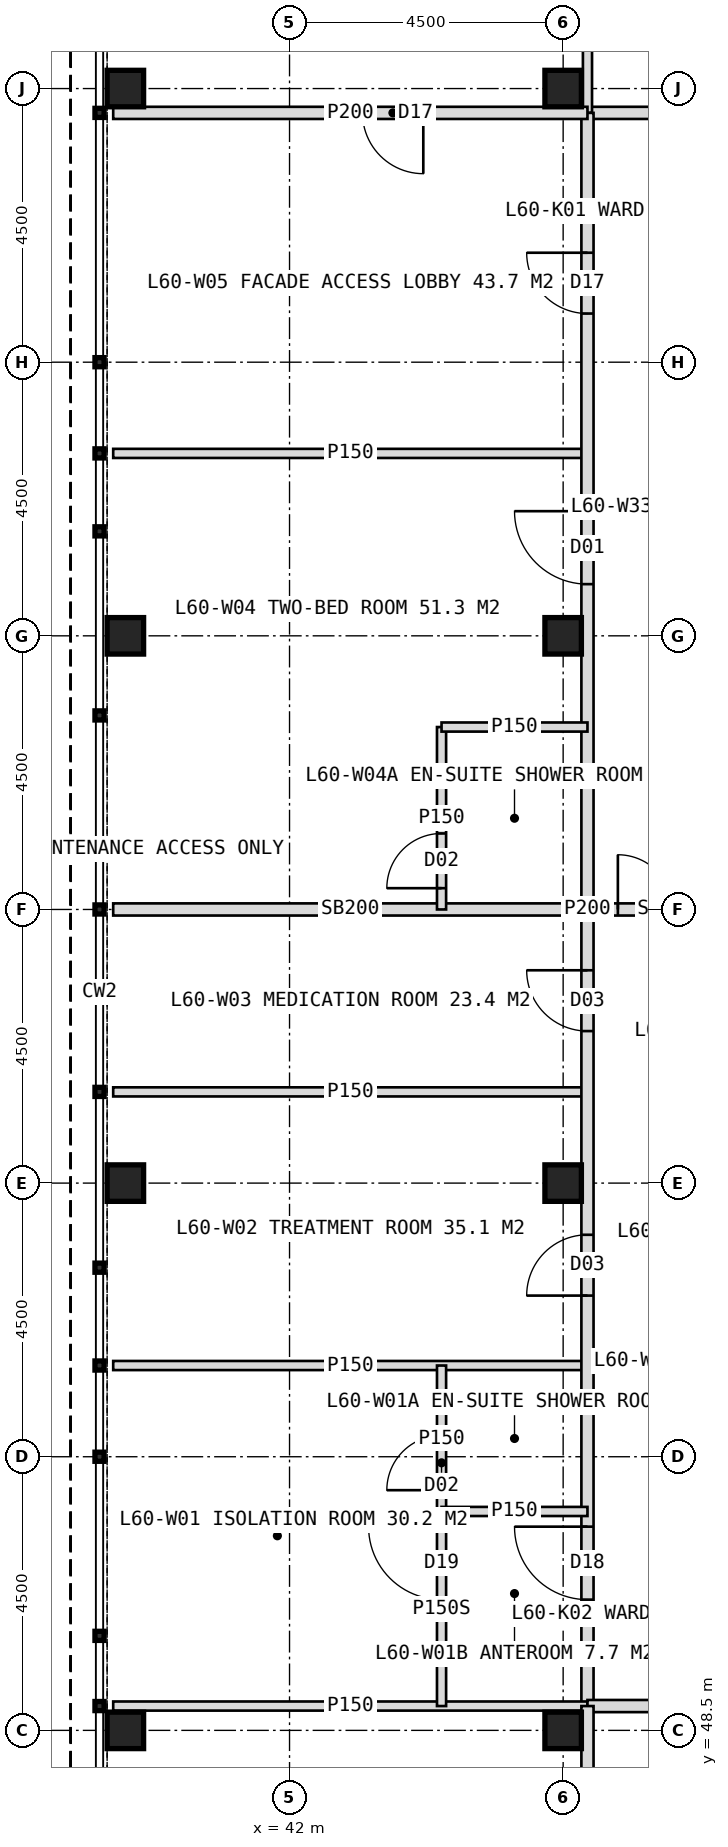
"""IFC4 building model, lengths in metres.
Left out: names, types, materials, properties, quantities, classifications, styles, units other than length and angle.
Written with IfcOpenShell. Run it as: python <this file> out.ifc"""

import sys

from ifc_helpers import new_model, si_unit, direction, frame, frame_2d, origin, origin_2d, place, context, subcontext, project, spatial, rectangle, hollow_rectangle, extrude, element, fill, save


model = new_model("IFC4")
c1 = context("Model", 3, precision=1e-05, world=origin(), true_north=direction((0.0, 1.0)))
c2 = subcontext(c1, "Body", "Model", "MODEL_VIEW")
j1 = project(units=[si_unit("LENGTHUNIT", "METRE"), si_unit("PLANEANGLEUNIT", "RADIAN")], contexts=[c1])
p1 = place(None, origin())
s1 = spatial("IfcSite", under=j1, at=p1, CompositionType="ELEMENT")
p2 = place(p1, origin())
s2 = spatial("IfcBuilding", under=s1, at=p2, CompositionType="ELEMENT")
p3 = place(p2, frame((0.0, 0.0, 250.0)))
s3 = spatial("IfcBuildingStorey", under=s2, at=p3, CompositionType="ELEMENT", Elevation=250.0)
for number, where, z_axis, x_axis in (
    (1, (46.5, 48.5, 0.0), (0.0, 0.0, 1.0), (1.0, 0.0, 0.0)),
    (2, (46.5, 75.5, 0.0), (0.0, 0.0, 1.0), (1.0, 0.0, 0.0)),
    (3, (46.5, 57.5, 0.0), (0.0, 0.0, 1.0), (1.0, 0.0, 0.0)),
    (4, (46.5, 66.5, 0.0), (0.0, 0.0, 1.0), (1.0, 0.0, 0.0)),
    (5, (39.3, 48.5, 0.0), (0.0, 0.0, 1.0), (1.0, 0.0, 0.0)),
    (6, (39.3, 57.5, 0.0), (0.0, 0.0, 1.0), (1.0, 0.0, 0.0)),
    (7, (39.3, 66.5, 0.0), (0.0, 0.0, 1.0), (1.0, 0.0, 0.0)),
    (8, (39.3, 75.5, 0.0), (0.0, 0.0, 1.0), (1.0, 0.0, 0.0)),
):
    element("IfcColumn", number, at=place(p3, frame(where, z_axis=z_axis, x_axis=x_axis)), inside=s3, PredefinedType="COLUMN", context=c2, shape_type="SweptSolid", body=[
        extrude(hollow_rectangle(XDim=0.6, YDim=0.6, WallThickness=0.04, at=origin_2d()), origin(), (0.0, 0.0, 1.0), 4.0),
    ])
p4 = place(p3, frame((46.9, 75.1, 0.0), z_axis=(0.0, 0.0, 1.0), x_axis=(1.0, 0.0, 0.0)))
e9 = element("IfcWall", 9, at=p4, inside=s3, PredefinedType="PARTITIONING", context=c2, shape_type="SweptSolid", body=[
    extrude(rectangle(XDim=26.2, YDim=0.2, at=frame_2d((13.1, 0.0))), origin(), (0.0, 0.0, 1.0), 3.75),
])
p5 = place(p4, frame((1.75, 0.0, 0.0)))
e10 = element("IfcOpeningElement", 10, at=p5, cuts=e9, PredefinedType="OPENING", context=c2, shape_type="SweptSolid", body=[
    extrude(rectangle(XDim=1.2, YDim=2.2, at=frame_2d((0.6, 1.1))), frame((0.0, 0.11, 0.0), z_axis=(0.0, -1.0, 0.0), x_axis=(1.0, 0.0, 0.0)), (0.0, 0.0, 1.0), 0.22),
])
p6 = place(p4, frame((6.75, 0.0, 0.0)))
e11 = element("IfcOpeningElement", 11, at=p6, cuts=e9, PredefinedType="OPENING", context=c2, shape_type="SweptSolid", body=[
    extrude(rectangle(XDim=1.0, YDim=2.1, at=frame_2d((0.5, 1.05))), frame((0.0, 0.11, 0.0), z_axis=(0.0, -1.0, 0.0), x_axis=(1.0, 0.0, 0.0)), (0.0, 0.0, 1.0), 0.22),
])
p7 = place(p4, frame((12.75, 0.0, 0.0)))
e12 = element("IfcOpeningElement", 12, at=p7, cuts=e9, PredefinedType="OPENING", context=c2, shape_type="SweptSolid", body=[
    extrude(rectangle(XDim=1.2, YDim=2.2, at=frame_2d((0.6, 1.1))), frame((0.0, 0.11, 0.0), z_axis=(0.0, -1.0, 0.0), x_axis=(1.0, 0.0, 0.0)), (0.0, 0.0, 1.0), 0.22),
])
p8 = place(p4, frame((20.45, 0.0, 0.0)))
e13 = element("IfcOpeningElement", 13, at=p8, cuts=e9, PredefinedType="OPENING", context=c2, shape_type="SweptSolid", body=[
    extrude(rectangle(XDim=0.9, YDim=2.1, at=frame_2d((0.45, 1.05))), frame((0.0, 0.11, 0.0), z_axis=(0.0, -1.0, 0.0), x_axis=(1.0, 0.0, 0.0)), (0.0, 0.0, 1.0), 0.22),
])
p9 = place(p4, frame((18.45, 0.0, 0.0)))
e14 = element("IfcOpeningElement", 14, at=p9, cuts=e9, PredefinedType="OPENING", context=c2, shape_type="SweptSolid", body=[
    extrude(rectangle(XDim=1.0, YDim=2.1, at=frame_2d((0.5, 1.05))), frame((0.0, 0.11, 0.0), z_axis=(0.0, -1.0, 0.0), x_axis=(1.0, 0.0, 0.0)), (0.0, 0.0, 1.0), 0.22),
])
p10 = place(p4, frame((23.65, 0.0, 0.0)))
e15 = element("IfcOpeningElement", 15, at=p10, cuts=e9, PredefinedType="OPENING", context=c2, shape_type="SweptSolid", body=[
    extrude(rectangle(XDim=1.0, YDim=2.1, at=frame_2d((0.5, 1.05))), frame((0.0, 0.11, 0.0), z_axis=(0.0, -1.0, 0.0), x_axis=(1.0, 0.0, 0.0)), (0.0, 0.0, 1.0), 0.22),
])
for number, where, z_axis, x_axis in (
    (16, (46.9, 75.1, 0.0), (0.0, 0.0, 1.0), (0.0, 1.0, 0.0)),
    (17, (46.9, 54.5, 0.0), (0.0, 0.0, 1.0), (-1.0, 0.0, 0.0)),
    (18, (46.9, 59.0, 0.0), (0.0, 0.0, 1.0), (-1.0, 0.0, 0.0)),
):
    element("IfcWall", number, at=place(p3, frame(where, z_axis=z_axis, x_axis=x_axis)), inside=s3, PredefinedType="PARTITIONING", context=c2, shape_type="SweptSolid", body=[
        extrude(rectangle(XDim=7.8, YDim=0.15, at=frame_2d((3.9, 0.0))), origin(), (0.0, 0.0, 1.0), 3.75),
    ])
p11 = place(p3, frame((46.9, 62.0, 0.0), z_axis=(0.0, 0.0, 1.0), x_axis=(-1.0, 0.0, 0.0)))
e19 = element("IfcWall", 19, at=p11, inside=s3, PredefinedType="SOLIDWALL", context=c2, shape_type="SweptSolid", body=[
    extrude(rectangle(XDim=7.8, YDim=0.2, at=frame_2d((3.9, 0.0))), origin(), (0.0, 0.0, 1.0), 2.75),
])
p12 = place(p3, frame((46.9, 69.5, 0.0), z_axis=(0.0, 0.0, 1.0), x_axis=(-1.0, 0.0, 0.0)))
e20 = element("IfcWall", 20, at=p12, inside=s3, PredefinedType="PARTITIONING", context=c2, shape_type="SweptSolid", body=[
    extrude(rectangle(XDim=7.8, YDim=0.15, at=frame_2d((3.9, 0.0))), origin(), (0.0, 0.0, 1.0), 3.75),
])
p13 = place(p3, frame((46.9, 48.9, 0.0), z_axis=(0.0, 0.0, 1.0), x_axis=(0.0, 1.0, 0.0)))
e21 = element("IfcWall", 21, at=p13, inside=s3, PredefinedType="PARTITIONING", context=c2, shape_type="SweptSolid", body=[
    extrude(rectangle(XDim=26.2, YDim=0.2, at=frame_2d((13.1, 0.0))), origin(), (0.0, 0.0, 1.0), 3.75),
])
p14 = place(p13, frame((1.75, 0.0, 0.0)))
e22 = element("IfcOpeningElement", 22, at=p14, cuts=e21, PredefinedType="OPENING", context=c2, shape_type="SweptSolid", body=[
    extrude(rectangle(XDim=1.2, YDim=2.2, at=frame_2d((0.6, 1.1))), frame((0.0, 0.11, 0.0), z_axis=(0.0, -1.0, 0.0), x_axis=(1.0, 0.0, 0.0)), (0.0, 0.0, 1.0), 0.22),
])
p15 = place(p13, frame((6.75, 0.0, 0.0)))
e23 = element("IfcOpeningElement", 23, at=p15, cuts=e21, PredefinedType="OPENING", context=c2, shape_type="SweptSolid", body=[
    extrude(rectangle(XDim=1.0, YDim=2.1, at=frame_2d((0.5, 1.05))), frame((0.0, 0.11, 0.0), z_axis=(0.0, -1.0, 0.0), x_axis=(1.0, 0.0, 0.0)), (0.0, 0.0, 1.0), 0.22),
])
p16 = place(p13, frame((11.1, 0.0, 0.0)))
e24 = element("IfcOpeningElement", 24, at=p16, cuts=e21, PredefinedType="OPENING", context=c2, shape_type="SweptSolid", body=[
    extrude(rectangle(XDim=1.0, YDim=2.1, at=frame_2d((0.5, 1.05))), frame((0.0, 0.11, 0.0), z_axis=(0.0, -1.0, 0.0), x_axis=(1.0, 0.0, 0.0)), (0.0, 0.0, 1.0), 0.22),
])
p17 = place(p13, frame((18.45, 0.0, 0.0)))
e25 = element("IfcOpeningElement", 25, at=p17, cuts=e21, PredefinedType="OPENING", context=c2, shape_type="SweptSolid", body=[
    extrude(rectangle(XDim=1.2, YDim=2.2, at=frame_2d((0.6, 1.1))), frame((0.0, 0.11, 0.0), z_axis=(0.0, -1.0, 0.0), x_axis=(1.0, 0.0, 0.0)), (0.0, 0.0, 1.0), 0.22),
])
p18 = place(p13, frame((22.9, 0.0, 0.0)))
e26 = element("IfcOpeningElement", 26, at=p18, cuts=e21, PredefinedType="OPENING", context=c2, shape_type="SweptSolid", body=[
    extrude(rectangle(XDim=1.0, YDim=2.1, at=frame_2d((0.5, 1.05))), frame((0.0, 0.11, 0.0), z_axis=(0.0, -1.0, 0.0), x_axis=(1.0, 0.0, 0.0)), (0.0, 0.0, 1.0), 0.22),
])
p19 = place(p3, frame((46.9, 48.9, 0.0), z_axis=(0.0, 0.0, 1.0), x_axis=(-1.0, 0.0, 0.0)))
e27 = element("IfcWall", 27, at=p19, inside=s3, PredefinedType="PARTITIONING", context=c2, shape_type="SweptSolid", body=[
    extrude(rectangle(XDim=7.8, YDim=0.15, at=frame_2d((3.9, 0.0))), origin(), (0.0, 0.0, 1.0), 3.75),
])
p20 = place(p3, frame((44.5, 52.1, 0.0), z_axis=(0.0, 0.0, 1.0), x_axis=(0.0, 1.0, 0.0)))
e28 = element("IfcWall", 28, at=p20, inside=s3, PredefinedType="PARTITIONING", context=c2, shape_type="SweptSolid", body=[
    extrude(rectangle(XDim=2.4, YDim=0.15, at=frame_2d((1.2, 0.0))), origin(), (0.0, 0.0, 1.0), 3.75),
])
p21 = place(p20, frame((0.35, 0.0, 0.0)))
e29 = element("IfcOpeningElement", 29, at=p21, cuts=e28, PredefinedType="OPENING", context=c2, shape_type="SweptSolid", body=[
    extrude(rectangle(XDim=0.9, YDim=2.1, at=frame_2d((0.45, 1.05))), frame((0.0, 0.085, 0.0), z_axis=(0.0, -1.0, 0.0), x_axis=(1.0, 0.0, 0.0)), (0.0, 0.0, 1.0), 0.17),
])
p22 = place(p3, frame((46.9, 52.1, 0.0), z_axis=(0.0, 0.0, 1.0), x_axis=(-1.0, 0.0, 0.0)))
e30 = element("IfcWall", 30, at=p22, inside=s3, PredefinedType="PARTITIONING", context=c2, shape_type="SweptSolid", body=[
    extrude(rectangle(XDim=2.4, YDim=0.15, at=frame_2d((1.2, 0.0))), origin(), (0.0, 0.0, 1.0), 3.75),
])
p23 = place(p3, frame((44.5, 48.9, 0.0), z_axis=(0.0, 0.0, 1.0), x_axis=(0.0, 1.0, 0.0)))
e31 = element("IfcWall", 31, at=p23, inside=s3, PredefinedType="PARTITIONING", context=c2, shape_type="SweptSolid", body=[
    extrude(rectangle(XDim=3.2, YDim=0.15, at=frame_2d((1.6, 0.0))), origin(), (0.0, 0.0, 1.0), 3.75),
])
p24 = place(p23, frame((1.75, 0.0, 0.0)))
e32 = element("IfcOpeningElement", 32, at=p24, cuts=e31, PredefinedType="OPENING", context=c2, shape_type="SweptSolid", body=[
    extrude(rectangle(XDim=1.2, YDim=2.2, at=frame_2d((0.6, 1.1))), frame((0.0, 0.085, 0.0), z_axis=(0.0, -1.0, 0.0), x_axis=(1.0, 0.0, 0.0)), (0.0, 0.0, 1.0), 0.17),
])
p25 = place(p3, frame((44.5, 62.0, 0.0), z_axis=(0.0, 0.0, 1.0), x_axis=(0.0, 1.0, 0.0)))
e33 = element("IfcWall", 33, at=p25, inside=s3, PredefinedType="PARTITIONING", context=c2, shape_type="SweptSolid", body=[
    extrude(rectangle(XDim=3.0, YDim=0.15, at=frame_2d((1.5, 0.0))), origin(), (0.0, 0.0, 1.0), 3.75),
])
p26 = place(p25, frame((0.35, 0.0, 0.0)))
e34 = element("IfcOpeningElement", 34, at=p26, cuts=e33, PredefinedType="OPENING", context=c2, shape_type="SweptSolid", body=[
    extrude(rectangle(XDim=0.9, YDim=2.1, at=frame_2d((0.45, 1.05))), frame((0.0, 0.085, 0.0), z_axis=(0.0, -1.0, 0.0), x_axis=(1.0, 0.0, 0.0)), (0.0, 0.0, 1.0), 0.17),
])
p27 = place(p3, frame((46.9, 65.0, 0.0), z_axis=(0.0, 0.0, 1.0), x_axis=(-1.0, 0.0, 0.0)))
e35 = element("IfcWall", 35, at=p27, inside=s3, PredefinedType="PARTITIONING", context=c2, shape_type="SweptSolid", body=[
    extrude(rectangle(XDim=2.4, YDim=0.15, at=frame_2d((1.2, 0.0))), origin(), (0.0, 0.0, 1.0), 3.75),
])
p28 = place(p3, frame((46.9, 75.1, 0.0), z_axis=(0.0, 0.0, 1.0), x_axis=(-1.0, 0.0, 0.0)))
e36 = element("IfcWall", 36, at=p28, inside=s3, PredefinedType="PARTITIONING", context=c2, shape_type="SweptSolid", body=[
    extrude(rectangle(XDim=7.8, YDim=0.2, at=frame_2d((3.9, 0.0))), origin(), (0.0, 0.0, 1.0), 3.75),
])
p29 = place(p28, frame((2.7, 0.0, 0.0)))
e37 = element("IfcOpeningElement", 37, at=p29, cuts=e36, PredefinedType="OPENING", context=c2, shape_type="SweptSolid", body=[
    extrude(rectangle(XDim=1.0, YDim=2.1, at=frame_2d((0.5, 1.05))), frame((0.0, 0.11, 0.0), z_axis=(0.0, -1.0, 0.0), x_axis=(1.0, 0.0, 0.0)), (0.0, 0.0, 1.0), 0.22),
])
p30 = place(p3, frame((73.1, 48.9, 0.0), z_axis=(0.0, 0.0, 1.0), x_axis=(-1.0, 0.0, 0.0)))
e38 = element("IfcWall", 38, at=p30, inside=s3, PredefinedType="PARTITIONING", context=c2, shape_type="SweptSolid", body=[
    extrude(rectangle(XDim=26.2, YDim=0.2, at=frame_2d((13.1, 0.0))), origin(), (0.0, 0.0, 1.0), 3.75),
])
p31 = place(p30, frame((1.75, 0.0, 0.0)))
e39 = element("IfcOpeningElement", 39, at=p31, cuts=e38, PredefinedType="OPENING", context=c2, shape_type="SweptSolid", body=[
    extrude(rectangle(XDim=1.2, YDim=2.2, at=frame_2d((0.6, 1.1))), frame((0.0, 0.11, 0.0), z_axis=(0.0, -1.0, 0.0), x_axis=(1.0, 0.0, 0.0)), (0.0, 0.0, 1.0), 0.22),
])
p32 = place(p30, frame((6.75, 0.0, 0.0)))
e40 = element("IfcOpeningElement", 40, at=p32, cuts=e38, PredefinedType="OPENING", context=c2, shape_type="SweptSolid", body=[
    extrude(rectangle(XDim=1.0, YDim=2.1, at=frame_2d((0.5, 1.05))), frame((0.0, 0.11, 0.0), z_axis=(0.0, -1.0, 0.0), x_axis=(1.0, 0.0, 0.0)), (0.0, 0.0, 1.0), 0.22),
])
p33 = place(p30, frame((11.1, 0.0, 0.0)))
e41 = element("IfcOpeningElement", 41, at=p33, cuts=e38, PredefinedType="OPENING", context=c2, shape_type="SweptSolid", body=[
    extrude(rectangle(XDim=1.0, YDim=2.1, at=frame_2d((0.5, 1.05))), frame((0.0, 0.11, 0.0), z_axis=(0.0, -1.0, 0.0), x_axis=(1.0, 0.0, 0.0)), (0.0, 0.0, 1.0), 0.22),
])
p34 = place(p30, frame((14.1, 0.0, 0.0)))
e42 = element("IfcOpeningElement", 42, at=p34, cuts=e38, PredefinedType="OPENING", context=c2, shape_type="SweptSolid", body=[
    extrude(rectangle(XDim=1.0, YDim=2.1, at=frame_2d((0.5, 1.05))), frame((0.0, 0.11, 0.0), z_axis=(0.0, -1.0, 0.0), x_axis=(1.0, 0.0, 0.0)), (0.0, 0.0, 1.0), 0.22),
])
p35 = place(p30, frame((18.45, 0.0, 0.0)))
e43 = element("IfcOpeningElement", 43, at=p35, cuts=e38, PredefinedType="OPENING", context=c2, shape_type="SweptSolid", body=[
    extrude(rectangle(XDim=1.0, YDim=2.1, at=frame_2d((0.5, 1.05))), frame((0.0, 0.11, 0.0), z_axis=(0.0, -1.0, 0.0), x_axis=(1.0, 0.0, 0.0)), (0.0, 0.0, 1.0), 0.22),
])
p36 = place(p30, frame((22.9, 0.0, 0.0)))
e44 = element("IfcOpeningElement", 44, at=p36, cuts=e38, PredefinedType="OPENING", context=c2, shape_type="SweptSolid", body=[
    extrude(rectangle(XDim=1.0, YDim=2.1, at=frame_2d((0.5, 1.05))), frame((0.0, 0.11, 0.0), z_axis=(0.0, -1.0, 0.0), x_axis=(1.0, 0.0, 0.0)), (0.0, 0.0, 1.0), 0.22),
])
p37 = place(p3, frame((46.9, 48.9, 0.0), z_axis=(0.0, 0.0, 1.0), x_axis=(0.0, -1.0, 0.0)))
e45 = element("IfcWall", 45, at=p37, inside=s3, PredefinedType="PARTITIONING", context=c2, shape_type="SweptSolid", body=[
    extrude(rectangle(XDim=7.8, YDim=0.2, at=frame_2d((3.9, 0.0))), origin(), (0.0, 0.0, 1.0), 3.75),
])
p38 = place(p37, frame((2.7, 0.0, 0.0)))
e46 = element("IfcOpeningElement", 46, at=p38, cuts=e45, PredefinedType="OPENING", context=c2, shape_type="SweptSolid", body=[
    extrude(rectangle(XDim=1.0, YDim=2.1, at=frame_2d((0.5, 1.05))), frame((0.0, 0.11, 0.0), z_axis=(0.0, -1.0, 0.0), x_axis=(1.0, 0.0, 0.0)), (0.0, 0.0, 1.0), 0.22),
])
p39 = place(p3, frame((49.5, 62.0, 0.0), z_axis=(0.0, 0.0, 1.0), x_axis=(-1.0, 0.0, 0.0)))
e47 = element("IfcWall", 47, at=p39, inside=s3, PredefinedType="SOLIDWALL", context=c2, shape_type="SweptSolid", body=[
    extrude(rectangle(XDim=2.6, YDim=0.2, at=frame_2d((1.3, 0.0))), origin(), (0.0, 0.0, 1.0), 2.75),
])
p40 = place(p39, frame((0.3, 0.0, 0.0)))
e48 = element("IfcOpeningElement", 48, at=p40, cuts=e47, PredefinedType="OPENING", context=c2, shape_type="SweptSolid", body=[
    extrude(rectangle(XDim=1.8, YDim=2.2, at=frame_2d((0.9, 1.1))), frame((0.0, 0.11, 0.0), z_axis=(0.0, -1.0, 0.0), x_axis=(1.0, 0.0, 0.0)), (0.0, 0.0, 1.0), 0.22),
])
p41 = place(p24, origin())
e49 = element("IfcDoor", 49, at=p41, inside=s3, OperationType="SINGLE_SWING_RIGHT", PredefinedType="DOOR", context=c2, shape_type="SweptSolid", body=[
    extrude(rectangle(XDim=1.2, YDim=2.2, at=frame_2d((0.6, 1.1))), frame((0.0, 0.025, 0.0), z_axis=(0.0, -1.0, 0.0), x_axis=(1.0, 0.0, 0.0)), (0.0, 0.0, 1.0), 0.05),
])
fill(e32, e49)
p42 = place(p14, origin())
e50 = element("IfcDoor", 50, at=p42, inside=s3, OperationType="SINGLE_SWING_RIGHT", PredefinedType="DOOR", context=c2, shape_type="SweptSolid", body=[
    extrude(rectangle(XDim=1.2, YDim=2.2, at=frame_2d((0.6, 1.1))), frame((0.0, 0.025, 0.0), z_axis=(0.0, -1.0, 0.0), x_axis=(1.0, 0.0, 0.0)), (0.0, 0.0, 1.0), 0.05),
])
fill(e22, e50)
p43 = place(p21, origin())
e51 = element("IfcDoor", 51, at=p43, inside=s3, OperationType="SINGLE_SWING_LEFT", PredefinedType="DOOR", context=c2, shape_type="SweptSolid", body=[
    extrude(rectangle(XDim=0.9, YDim=2.1, at=frame_2d((0.45, 1.05))), frame((0.0, 0.025, 0.0), z_axis=(0.0, -1.0, 0.0), x_axis=(1.0, 0.0, 0.0)), (0.0, 0.0, 1.0), 0.05),
])
fill(e29, e51)
p44 = place(p15, origin())
e52 = element("IfcDoor", 52, at=p44, inside=s3, OperationType="SINGLE_SWING_LEFT", PredefinedType="DOOR", context=c2, shape_type="SweptSolid", body=[
    extrude(rectangle(XDim=1.0, YDim=2.1, at=frame_2d((0.5, 1.05))), frame((0.0, 0.025, 0.0), z_axis=(0.0, -1.0, 0.0), x_axis=(1.0, 0.0, 0.0)), (0.0, 0.0, 1.0), 0.05),
])
fill(e23, e52)
p45 = place(p16, origin())
e53 = element("IfcDoor", 53, at=p45, inside=s3, OperationType="SINGLE_SWING_RIGHT", PredefinedType="DOOR", context=c2, shape_type="SweptSolid", body=[
    extrude(rectangle(XDim=1.0, YDim=2.1, at=frame_2d((0.5, 1.05))), frame((0.0, 0.025, 0.0), z_axis=(0.0, -1.0, 0.0), x_axis=(1.0, 0.0, 0.0)), (0.0, 0.0, 1.0), 0.05),
])
fill(e24, e53)
p46 = place(p17, origin())
e54 = element("IfcDoor", 54, at=p46, inside=s3, OperationType="SINGLE_SWING_RIGHT", PredefinedType="DOOR", context=c2, shape_type="SweptSolid", body=[
    extrude(rectangle(XDim=1.2, YDim=2.2, at=frame_2d((0.6, 1.1))), frame((0.0, 0.025, 0.0), z_axis=(0.0, -1.0, 0.0), x_axis=(1.0, 0.0, 0.0)), (0.0, 0.0, 1.0), 0.05),
])
fill(e25, e54)
p47 = place(p26, origin())
e55 = element("IfcDoor", 55, at=p47, inside=s3, OperationType="SINGLE_SWING_LEFT", PredefinedType="DOOR", context=c2, shape_type="SweptSolid", body=[
    extrude(rectangle(XDim=0.9, YDim=2.1, at=frame_2d((0.45, 1.05))), frame((0.0, 0.025, 0.0), z_axis=(0.0, -1.0, 0.0), x_axis=(1.0, 0.0, 0.0)), (0.0, 0.0, 1.0), 0.05),
])
fill(e34, e55)
p48 = place(p29, origin())
e56 = element("IfcDoor", 56, at=p48, inside=s3, OperationType="SINGLE_SWING_LEFT", PredefinedType="DOOR", context=c2, shape_type="SweptSolid", body=[
    extrude(rectangle(XDim=1.0, YDim=2.1, at=frame_2d((0.5, 1.05))), frame((0.0, 0.025, 0.0), z_axis=(0.0, -1.0, 0.0), x_axis=(1.0, 0.0, 0.0)), (0.0, 0.0, 1.0), 0.05),
])
fill(e37, e56)
p49 = place(p18, origin())
e57 = element("IfcDoor", 57, at=p49, inside=s3, OperationType="SINGLE_SWING_RIGHT", PredefinedType="DOOR", context=c2, shape_type="SweptSolid", body=[
    extrude(rectangle(XDim=1.0, YDim=2.1, at=frame_2d((0.5, 1.05))), frame((0.0, 0.025, 0.0), z_axis=(0.0, -1.0, 0.0), x_axis=(1.0, 0.0, 0.0)), (0.0, 0.0, 1.0), 0.05),
])
fill(e26, e57)
p50 = place(p40, origin())
e58 = element("IfcDoor", 58, at=p50, inside=s3, OperationType="DOUBLE_DOOR_DOUBLE_SWING", PredefinedType="DOOR", context=c2, shape_type="SweptSolid", body=[
    extrude(rectangle(XDim=1.8, YDim=2.2, at=frame_2d((0.9, 1.1))), frame((0.0, 0.025, 0.0), z_axis=(0.0, -1.0, 0.0), x_axis=(1.0, 0.0, 0.0)), (0.0, 0.0, 1.0), 0.05),
])
fill(e48, e58)
save(model, sys.argv[1])
